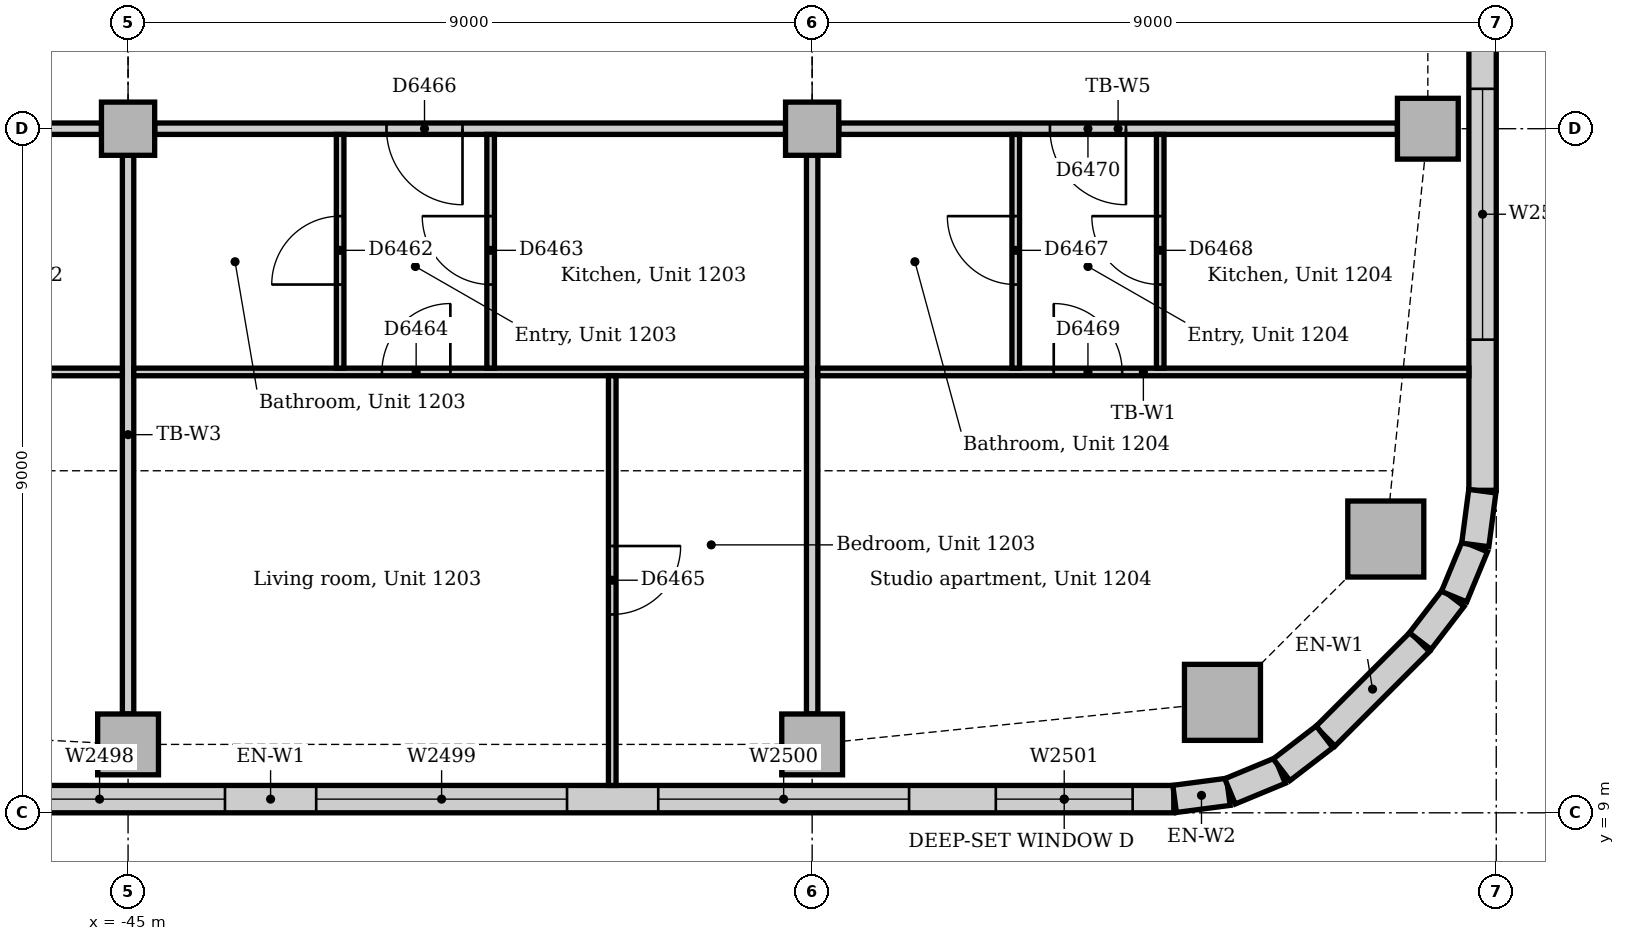
"""IFC4 building model, lengths in metres.
Left out: names, types, materials, properties, quantities, classifications, styles, units other than length and angle.
Written with IfcOpenShell. Run it as: python <this file> out.ifc"""

import sys

from ifc_helpers import new_model, si_unit, direction, frame, frame_2d, origin, origin_2d, place, context, subcontext, project, spatial, rectangle, extrude, element, fill, save


model = new_model("IFC4")
c1 = context("Model", 3, precision=1e-05, world=origin(), true_north=direction((0.0, 1.0)))
c2 = subcontext(c1, "Body", "Model", "MODEL_VIEW")
j1 = project(units=[si_unit("LENGTHUNIT", "METRE"), si_unit("PLANEANGLEUNIT", "RADIAN")], contexts=[c1])
p1 = place(None, origin())
s1 = spatial("IfcSite", under=j1, at=p1, CompositionType="ELEMENT")
p2 = place(p1, origin())
s2 = spatial("IfcBuilding", under=s1, at=p2, CompositionType="ELEMENT")
p3 = place(p2, frame((0.0, 0.0, 55.0)))
s3 = spatial("IfcBuildingStorey", under=s2, at=p3, CompositionType="ELEMENT", Elevation=55.0)
for number, where, z_axis, x_axis in (
    (1, (-30.602, 10.453, 0.0), (0.0, 0.0, 1.0), (1.0, 0.0, 0.0)),
    (2, (-28.453, 12.602, 0.0), (0.0, 0.0, 1.0), (1.0, 0.0, 0.0)),
):
    element("IfcColumn", number, at=place(p3, frame(where, z_axis=z_axis, x_axis=x_axis)), inside=s3, PredefinedType="COLUMN", context=c2, shape_type="SweptSolid", body=[
        extrude(rectangle(XDim=1.0, YDim=1.0, at=origin_2d()), origin(), (0.0, 0.0, 1.0), 3.85),
    ])
for number, where, z_axis, x_axis in (
    (3, (-45.0, 9.9, 0.0), (0.0, 0.0, 1.0), (1.0, 0.0, 0.0)),
    (4, (-36.0, 9.9, 0.0), (0.0, 0.0, 1.0), (1.0, 0.0, 0.0)),
    (5, (-27.9, 18.0, 0.0), (0.0, 0.0, 1.0), (1.0, 0.0, 0.0)),
):
    element("IfcColumn", number, at=place(p3, frame(where, z_axis=z_axis, x_axis=x_axis)), inside=s3, PredefinedType="COLUMN", context=c2, shape_type="SweptSolid", body=[
        extrude(rectangle(XDim=0.8, YDim=0.8, at=origin_2d()), origin(), (0.0, 0.0, 1.0), 3.85),
    ])
for number, where, z_axis, x_axis in (
    (6, (-45.0, 18.0, 0.0), (0.0, 0.0, 1.0), (1.0, 0.0, 0.0)),
    (7, (-36.0, 18.0, 0.0), (0.0, 0.0, 1.0), (1.0, 0.0, 0.0)),
):
    element("IfcColumn", number, at=place(p3, frame(where, z_axis=z_axis, x_axis=x_axis)), inside=s3, PredefinedType="COLUMN", context=c2, shape_type="SweptSolid", body=[
        extrude(rectangle(XDim=0.7, YDim=0.7, at=origin_2d()), origin(), (0.0, 0.0, 1.0), 3.85),
    ])
p4 = place(p3, frame((-55.007, 9.18, 0.0), z_axis=(0.0, 0.0, 1.0), x_axis=(1.0, 0.0, 0.0)))
e8 = element("IfcWall", 8, at=p4, inside=s3, PredefinedType="STANDARD", context=c2, shape_type="SweptSolid", body=[
    extrude(rectangle(XDim=23.765, YDim=0.36, at=frame_2d((11.882, 0.0))), origin(), (0.0, 0.0, 1.0), 3.85),
])
p5 = place(p4, frame((3.482, 0.0, 0.9)))
e9 = element("IfcOpeningElement", 9, at=p5, cuts=e8, PredefinedType="OPENING", context=c2, shape_type="SweptSolid", body=[
    extrude(rectangle(XDim=3.3, YDim=1.6, at=frame_2d((1.65, 0.8))), frame((0.0, 0.19, 0.0), z_axis=(0.0, -1.0, 0.0), x_axis=(1.0, 0.0, 0.0)), (0.0, 0.0, 1.0), 0.38),
])
p6 = place(p4, frame((7.982, 0.0, 0.9)))
e10 = element("IfcOpeningElement", 10, at=p6, cuts=e8, PredefinedType="OPENING", context=c2, shape_type="SweptSolid", body=[
    extrude(rectangle(XDim=3.3, YDim=1.6, at=frame_2d((1.65, 0.8))), frame((0.0, 0.19, 0.0), z_axis=(0.0, -1.0, 0.0), x_axis=(1.0, 0.0, 0.0)), (0.0, 0.0, 1.0), 0.38),
])
p7 = place(p4, frame((12.482, 0.0, 0.9)))
e11 = element("IfcOpeningElement", 11, at=p7, cuts=e8, PredefinedType="OPENING", context=c2, shape_type="SweptSolid", body=[
    extrude(rectangle(XDim=3.3, YDim=1.6, at=frame_2d((1.65, 0.8))), frame((0.0, 0.19, 0.0), z_axis=(0.0, -1.0, 0.0), x_axis=(1.0, 0.0, 0.0)), (0.0, 0.0, 1.0), 0.38),
])
p8 = place(p4, frame((16.982, 0.0, 0.9)))
e12 = element("IfcOpeningElement", 12, at=p8, cuts=e8, PredefinedType="OPENING", context=c2, shape_type="SweptSolid", body=[
    extrude(rectangle(XDim=3.3, YDim=1.6, at=frame_2d((1.65, 0.8))), frame((0.0, 0.19, 0.0), z_axis=(0.0, -1.0, 0.0), x_axis=(1.0, 0.0, 0.0)), (0.0, 0.0, 1.0), 0.38),
])
p9 = place(p4, frame((21.424, 0.0, 0.9)))
e13 = element("IfcOpeningElement", 13, at=p9, cuts=e8, PredefinedType="OPENING", context=c2, shape_type="SweptSolid", body=[
    extrude(rectangle(XDim=1.8, YDim=1.6, at=frame_2d((0.9, 0.8))), frame((0.0, 0.19, 0.0), z_axis=(0.0, -1.0, 0.0), x_axis=(1.0, 0.0, 0.0)), (0.0, 0.0, 1.0), 0.38),
])
p10 = place(p3, frame((-29.249, 10.006, 0.0), z_axis=(0.0, 0.0, 1.0), x_axis=(0.707106781187, 0.707106781187, 0.0)))
e14 = element("IfcWall", 14, at=p10, inside=s3, PredefinedType="STANDARD", context=c2, shape_type="SweptSolid", body=[
    extrude(rectangle(XDim=1.757, YDim=0.36, at=frame_2d((0.879, 0.0))), origin(), (0.0, 0.0, 1.0), 3.85),
])
p11 = place(p3, frame((-27.18, 13.243, 0.0), z_axis=(0.0, 0.0, 1.0), x_axis=(0.0, 1.0, 0.0)))
e15 = element("IfcWall", 15, at=p11, inside=s3, PredefinedType="STANDARD", context=c2, shape_type="SweptSolid", body=[
    extrude(rectangle(XDim=7.757, YDim=0.36, at=frame_2d((3.879, 0.0))), origin(), (0.0, 0.0, 1.0), 3.85),
])
p12 = place(p11, frame((1.982, 0.0, 0.9)))
e16 = element("IfcOpeningElement", 16, at=p12, cuts=e15, PredefinedType="OPENING", context=c2, shape_type="SweptSolid", body=[
    extrude(rectangle(XDim=3.3, YDim=1.6, at=frame_2d((1.65, 0.8))), frame((0.0, 0.19, 0.0), z_axis=(0.0, -1.0, 0.0), x_axis=(1.0, 0.0, 0.0)), (0.0, 0.0, 1.0), 0.38),
])
for number, where, z_axis, x_axis in (
    (17, (-31.231, 9.183, 0.0), (0.0, 0.0, 1.0), (0.991, 0.131, 0.0)),
    (18, (-30.503, 9.282, 0.0), (0.0, 0.0, 1.0), (0.924, 0.383, 0.0)),
):
    element("IfcWall", number, at=place(p3, frame(where, z_axis=z_axis, x_axis=x_axis)), inside=s3, PredefinedType="STANDARD", context=c2, shape_type="SweptSolid", body=[
        extrude(rectangle(XDim=0.713, YDim=0.36, at=frame_2d((0.356, 0.0))), origin(), (0.0, 0.0, 1.0), 3.85),
    ])
for number, where, z_axis, x_axis in (
    (19, (-29.825, 9.566, 0.0), (0.0, 0.0, 1.0), (0.793, 0.609, 0.0)),
    (20, (-28.0, 11.259, 0.0), (0.0, 0.0, 1.0), (0.609, 0.793, 0.0)),
):
    element("IfcWall", number, at=place(p3, frame(where, z_axis=z_axis, x_axis=x_axis)), inside=s3, PredefinedType="STANDARD", context=c2, shape_type="SweptSolid", body=[
        extrude(rectangle(XDim=0.713, YDim=0.36, at=frame_2d((0.357, 0.0))), origin(), (0.0, 0.0, 1.0), 3.85),
    ])
for number, where, z_axis, x_axis in (
    (21, (-27.555, 11.844, 0.0), (0.0, 0.0, 1.0), (0.383, 0.924, 0.0)),
    (22, (-27.276, 12.524, 0.0), (0.0, 0.0, 1.0), (0.131, 0.991, 0.0)),
):
    element("IfcWall", number, at=place(p3, frame(where, z_axis=z_axis, x_axis=x_axis)), inside=s3, PredefinedType="STANDARD", context=c2, shape_type="SweptSolid", body=[
        extrude(rectangle(XDim=0.713, YDim=0.36, at=frame_2d((0.356, 0.0))), origin(), (0.0, 0.0, 1.0), 3.85),
    ])
p13 = place(p3, frame((-35.65, 18.0, 0.0), z_axis=(0.0, 0.0, 1.0), x_axis=(1.0, 0.0, 0.0)))
e23 = element("IfcWall", 23, at=p13, inside=s3, PredefinedType="PARTITIONING", context=c2, shape_type="SweptSolid", body=[
    extrude(rectangle(XDim=7.35, YDim=0.15, at=frame_2d((3.675, 0.0))), origin(), (0.0, 0.0, 1.0), 3.158),
])
p14 = place(p13, frame((2.778, 0.0, 0.0)))
e24 = element("IfcOpeningElement", 24, at=p14, cuts=e23, PredefinedType="OPENING", context=c2, shape_type="SweptSolid", body=[
    extrude(rectangle(XDim=1.0, YDim=2.1, at=frame_2d((0.5, 1.05))), frame((0.0, 0.085, 0.0), z_axis=(0.0, -1.0, 0.0), x_axis=(1.0, 0.0, 0.0)), (0.0, 0.0, 1.0), 0.17),
])
p15 = place(p3, frame((-44.65, 18.0, 0.0), z_axis=(0.0, 0.0, 1.0), x_axis=(1.0, 0.0, 0.0)))
e25 = element("IfcWall", 25, at=p15, inside=s3, PredefinedType="PARTITIONING", context=c2, shape_type="SweptSolid", body=[
    extrude(rectangle(XDim=8.3, YDim=0.15, at=frame_2d((4.15, 0.0))), origin(), (0.0, 0.0, 1.0), 3.158),
])
p16 = place(p15, frame((3.05, 0.0, 0.0)))
e26 = element("IfcOpeningElement", 26, at=p16, cuts=e25, PredefinedType="OPENING", context=c2, shape_type="SweptSolid", body=[
    extrude(rectangle(XDim=1.0, YDim=2.1, at=frame_2d((0.5, 1.05))), frame((0.0, 0.085, 0.0), z_axis=(0.0, -1.0, 0.0), x_axis=(1.0, 0.0, 0.0)), (0.0, 0.0, 1.0), 0.17),
])
p17 = place(p3, frame((-53.65, 18.0, 0.0), z_axis=(0.0, 0.0, 1.0), x_axis=(1.0, 0.0, 0.0)))
e27 = element("IfcWall", 27, at=p17, inside=s3, PredefinedType="PARTITIONING", context=c2, shape_type="SweptSolid", body=[
    extrude(rectangle(XDim=8.3, YDim=0.15, at=frame_2d((4.15, 0.0))), origin(), (0.0, 0.0, 1.0), 3.158),
])
p18 = place(p17, frame((2.94, 0.0, 0.0)))
e28 = element("IfcOpeningElement", 28, at=p18, cuts=e27, PredefinedType="OPENING", context=c2, shape_type="SweptSolid", body=[
    extrude(rectangle(XDim=1.0, YDim=2.1, at=frame_2d((0.5, 1.05))), frame((0.0, 0.085, 0.0), z_axis=(0.0, -1.0, 0.0), x_axis=(1.0, 0.0, 0.0)), (0.0, 0.0, 1.0), 0.17),
])
for number, where, z_axis, x_axis in (
    (29, (-45.0, 10.3, 0.0), (0.0, 0.0, 1.0), (0.0, 1.0, 0.0)),
    (30, (-36.0, 10.3, 0.0), (0.0, 0.0, 1.0), (0.0, 1.0, 0.0)),
):
    element("IfcWall", number, at=place(p3, frame(where, z_axis=z_axis, x_axis=x_axis)), inside=s3, PredefinedType="PARTITIONING", context=c2, shape_type="SweptSolid", body=[
        extrude(rectangle(XDim=7.35, YDim=0.15, at=frame_2d((3.675, 0.0))), origin(), (0.0, 0.0, 1.0), 3.256),
    ])
p19 = place(p3, frame((-54.05, 14.8, 0.0), z_axis=(0.0, 0.0, 1.0), x_axis=(1.0, 0.0, 0.0)))
e31 = element("IfcWall", 31, at=p19, inside=s3, PredefinedType="PARTITIONING", context=c2, shape_type="SweptSolid", body=[
    extrude(rectangle(XDim=8.975, YDim=0.1, at=frame_2d((4.487, 0.0))), origin(), (0.0, 0.0, 1.0), 3.85),
])
p20 = place(p19, frame((3.39, 0.0, 0.0)))
e32 = element("IfcOpeningElement", 32, at=p20, cuts=e31, PredefinedType="OPENING", context=c2, shape_type="SweptSolid", body=[
    extrude(rectangle(XDim=0.9, YDim=2.1, at=frame_2d((0.45, 1.05))), frame((0.0, 0.06, 0.0), z_axis=(0.0, -1.0, 0.0), x_axis=(1.0, 0.0, 0.0)), (0.0, 0.0, 1.0), 0.12),
])
p21 = place(p3, frame((-44.925, 14.8, 0.0), z_axis=(0.0, 0.0, 1.0), x_axis=(1.0, 0.0, 0.0)))
e33 = element("IfcWall", 33, at=p21, inside=s3, PredefinedType="PARTITIONING", context=c2, shape_type="SweptSolid", body=[
    extrude(rectangle(XDim=8.85, YDim=0.1, at=frame_2d((4.425, 0.0))), origin(), (0.0, 0.0, 1.0), 3.85),
])
p22 = place(p21, frame((3.265, 0.0, 0.0)))
e34 = element("IfcOpeningElement", 34, at=p22, cuts=e33, PredefinedType="OPENING", context=c2, shape_type="SweptSolid", body=[
    extrude(rectangle(XDim=0.9, YDim=2.1, at=frame_2d((0.45, 1.05))), frame((0.0, 0.06, 0.0), z_axis=(0.0, -1.0, 0.0), x_axis=(1.0, 0.0, 0.0)), (0.0, 0.0, 1.0), 0.12),
])
p23 = place(p3, frame((-35.925, 14.8, 0.0), z_axis=(0.0, 0.0, 1.0), x_axis=(1.0, 0.0, 0.0)))
e35 = element("IfcWall", 35, at=p23, inside=s3, PredefinedType="PARTITIONING", context=c2, shape_type="SweptSolid", body=[
    extrude(rectangle(XDim=8.565, YDim=0.1, at=frame_2d((4.282, 0.0))), origin(), (0.0, 0.0, 1.0), 3.85),
])
p24 = place(p23, frame((3.103, 0.0, 0.0)))
e36 = element("IfcOpeningElement", 36, at=p24, cuts=e35, PredefinedType="OPENING", context=c2, shape_type="SweptSolid", body=[
    extrude(rectangle(XDim=0.9, YDim=2.1, at=frame_2d((0.45, 1.05))), frame((0.0, 0.06, 0.0), z_axis=(0.0, -1.0, 0.0), x_axis=(1.0, 0.0, 0.0)), (0.0, 0.0, 1.0), 0.12),
])
p25 = place(p3, frame((-38.63, 9.36, 0.0), z_axis=(0.0, 0.0, 1.0), x_axis=(0.0, 1.0, 0.0)))
e37 = element("IfcWall", 37, at=p25, inside=s3, PredefinedType="PARTITIONING", context=c2, shape_type="SweptSolid", body=[
    extrude(rectangle(XDim=5.39, YDim=0.1, at=frame_2d((2.695, 0.0))), origin(), (0.0, 0.0, 1.0), 3.85),
])
p26 = place(p25, frame((2.25, 0.0, 0.0)))
e38 = element("IfcOpeningElement", 38, at=p26, cuts=e37, PredefinedType="OPENING", context=c2, shape_type="SweptSolid", body=[
    extrude(rectangle(XDim=0.9, YDim=2.1, at=frame_2d((0.45, 1.05))), frame((0.0, 0.06, 0.0), z_axis=(0.0, -1.0, 0.0), x_axis=(1.0, 0.0, 0.0)), (0.0, 0.0, 1.0), 0.12),
])
p27 = place(p3, frame((-42.21, 14.85, 0.0), z_axis=(0.0, 0.0, 1.0), x_axis=(0.0, 1.0, 0.0)))
e39 = element("IfcWall", 39, at=p27, inside=s3, PredefinedType="PARTITIONING", context=c2, shape_type="SweptSolid", body=[
    extrude(rectangle(XDim=3.075, YDim=0.1, at=frame_2d((1.538, 0.0))), origin(), (0.0, 0.0, 1.0), 3.85),
])
p28 = place(p27, frame((1.1, 0.0, 0.0)))
e40 = element("IfcOpeningElement", 40, at=p28, cuts=e39, PredefinedType="OPENING", context=c2, shape_type="SweptSolid", body=[
    extrude(rectangle(XDim=0.9, YDim=2.1, at=frame_2d((0.45, 1.05))), frame((0.0, 0.06, 0.0), z_axis=(0.0, -1.0, 0.0), x_axis=(1.0, 0.0, 0.0)), (0.0, 0.0, 1.0), 0.12),
])
p29 = place(p3, frame((-40.23, 14.85, 0.0), z_axis=(0.0, 0.0, 1.0), x_axis=(0.0, 1.0, 0.0)))
e41 = element("IfcWall", 41, at=p29, inside=s3, PredefinedType="PARTITIONING", context=c2, shape_type="SweptSolid", body=[
    extrude(rectangle(XDim=3.075, YDim=0.1, at=frame_2d((1.538, 0.0))), origin(), (0.0, 0.0, 1.0), 3.85),
])
p30 = place(p29, frame((1.1, 0.0, 0.0)))
e42 = element("IfcOpeningElement", 42, at=p30, cuts=e41, PredefinedType="OPENING", context=c2, shape_type="SweptSolid", body=[
    extrude(rectangle(XDim=0.9, YDim=2.1, at=frame_2d((0.45, 1.05))), frame((0.0, 0.06, 0.0), z_axis=(0.0, -1.0, 0.0), x_axis=(1.0, 0.0, 0.0)), (0.0, 0.0, 1.0), 0.12),
])
p31 = place(p3, frame((-33.322, 14.85, 0.0), z_axis=(0.0, 0.0, 1.0), x_axis=(0.0, 1.0, 0.0)))
e43 = element("IfcWall", 43, at=p31, inside=s3, PredefinedType="PARTITIONING", context=c2, shape_type="SweptSolid", body=[
    extrude(rectangle(XDim=3.075, YDim=0.1, at=frame_2d((1.538, 0.0))), origin(), (0.0, 0.0, 1.0), 3.85),
])
p32 = place(p31, frame((1.1, 0.0, 0.0)))
e44 = element("IfcOpeningElement", 44, at=p32, cuts=e43, PredefinedType="OPENING", context=c2, shape_type="SweptSolid", body=[
    extrude(rectangle(XDim=0.9, YDim=2.1, at=frame_2d((0.45, 1.05))), frame((0.0, 0.06, 0.0), z_axis=(0.0, -1.0, 0.0), x_axis=(1.0, 0.0, 0.0)), (0.0, 0.0, 1.0), 0.12),
])
p33 = place(p3, frame((-31.421, 14.85, 0.0), z_axis=(0.0, 0.0, 1.0), x_axis=(0.0, 1.0, 0.0)))
e45 = element("IfcWall", 45, at=p33, inside=s3, PredefinedType="PARTITIONING", context=c2, shape_type="SweptSolid", body=[
    extrude(rectangle(XDim=3.075, YDim=0.1, at=frame_2d((1.538, 0.0))), origin(), (0.0, 0.0, 1.0), 3.85),
])
p34 = place(p33, frame((1.1, 0.0, 0.0)))
e46 = element("IfcOpeningElement", 46, at=p34, cuts=e45, PredefinedType="OPENING", context=c2, shape_type="SweptSolid", body=[
    extrude(rectangle(XDim=0.9, YDim=2.1, at=frame_2d((0.45, 1.05))), frame((0.0, 0.06, 0.0), z_axis=(0.0, -1.0, 0.0), x_axis=(1.0, 0.0, 0.0)), (0.0, 0.0, 1.0), 0.12),
])
p35 = place(p6, origin())
e47 = element("IfcWindow", 47, at=p35, inside=s3, PartitioningType="SINGLE_PANEL", PredefinedType="WINDOW", context=c2, shape_type="SweptSolid", body=[
    extrude(rectangle(XDim=3.3, YDim=1.6, at=frame_2d((1.65, 0.8))), frame((0.0, 0.13, 0.0), z_axis=(0.0, -1.0, 0.0), x_axis=(1.0, 0.0, 0.0)), (0.0, 0.0, 1.0), 0.06),
])
fill(e10, e47)
p36 = place(p7, origin())
e48 = element("IfcWindow", 48, at=p36, inside=s3, PartitioningType="SINGLE_PANEL", PredefinedType="WINDOW", context=c2, shape_type="SweptSolid", body=[
    extrude(rectangle(XDim=3.3, YDim=1.6, at=frame_2d((1.65, 0.8))), frame((0.0, 0.13, 0.0), z_axis=(0.0, -1.0, 0.0), x_axis=(1.0, 0.0, 0.0)), (0.0, 0.0, 1.0), 0.06),
])
fill(e11, e48)
p37 = place(p8, origin())
e49 = element("IfcWindow", 49, at=p37, inside=s3, PartitioningType="SINGLE_PANEL", PredefinedType="WINDOW", context=c2, shape_type="SweptSolid", body=[
    extrude(rectangle(XDim=3.3, YDim=1.6, at=frame_2d((1.65, 0.8))), frame((0.0, 0.13, 0.0), z_axis=(0.0, -1.0, 0.0), x_axis=(1.0, 0.0, 0.0)), (0.0, 0.0, 1.0), 0.06),
])
fill(e12, e49)
p38 = place(p9, origin())
e50 = element("IfcWindow", 50, at=p38, inside=s3, PartitioningType="SINGLE_PANEL", PredefinedType="WINDOW", context=c2, shape_type="SweptSolid", body=[
    extrude(rectangle(XDim=1.8, YDim=1.6, at=frame_2d((0.9, 0.8))), frame((0.0, 0.13, 0.0), z_axis=(0.0, -1.0, 0.0), x_axis=(1.0, 0.0, 0.0)), (0.0, 0.0, 1.0), 0.06),
])
fill(e13, e50)
p39 = place(p12, origin())
e51 = element("IfcWindow", 51, at=p39, inside=s3, PartitioningType="SINGLE_PANEL", PredefinedType="WINDOW", context=c2, shape_type="SweptSolid", body=[
    extrude(rectangle(XDim=3.3, YDim=1.6, at=frame_2d((1.65, 0.8))), frame((0.0, 0.13, 0.0), z_axis=(0.0, -1.0, 0.0), x_axis=(1.0, 0.0, 0.0)), (0.0, 0.0, 1.0), 0.06),
])
fill(e16, e51)
p40 = place(p28, origin())
e52 = element("IfcDoor", 52, at=p40, inside=s3, OperationType="SINGLE_SWING_LEFT", PredefinedType="DOOR", context=c2, shape_type="SweptSolid", body=[
    extrude(rectangle(XDim=0.9, YDim=2.1, at=frame_2d((0.45, 1.05))), frame((0.0, 0.025, 0.0), z_axis=(0.0, -1.0, 0.0), x_axis=(1.0, 0.0, 0.0)), (0.0, 0.0, 1.0), 0.05),
])
fill(e40, e52)
p41 = place(p30, origin())
e53 = element("IfcDoor", 53, at=p41, inside=s3, OperationType="SINGLE_SWING_RIGHT", PredefinedType="DOOR", context=c2, shape_type="SweptSolid", body=[
    extrude(rectangle(XDim=0.9, YDim=2.1, at=frame_2d((0.45, 1.05))), frame((0.0, 0.025, 0.0), z_axis=(0.0, -1.0, 0.0), x_axis=(1.0, 0.0, 0.0)), (0.0, 0.0, 1.0), 0.05),
])
fill(e42, e53)
p42 = place(p22, origin())
e54 = element("IfcDoor", 54, at=p42, inside=s3, OperationType="SINGLE_SWING_RIGHT", PredefinedType="DOOR", context=c2, shape_type="SweptSolid", body=[
    extrude(rectangle(XDim=0.9, YDim=2.1, at=frame_2d((0.45, 1.05))), frame((0.0, 0.025, 0.0), z_axis=(0.0, -1.0, 0.0), x_axis=(1.0, 0.0, 0.0)), (0.0, 0.0, 1.0), 0.05),
])
fill(e34, e54)
p43 = place(p26, frame((0.9, 0.0, 0.0), z_axis=(0.0, 0.0, 1.0), x_axis=(-1.0, 0.0, 0.0)))
e55 = element("IfcDoor", 55, at=p43, inside=s3, OperationType="SINGLE_SWING_LEFT", PredefinedType="DOOR", context=c2, shape_type="SweptSolid", body=[
    extrude(rectangle(XDim=0.9, YDim=2.1, at=frame_2d((0.45, 1.05))), frame((0.0, 0.025, 0.0), z_axis=(0.0, -1.0, 0.0), x_axis=(1.0, 0.0, 0.0)), (0.0, 0.0, 1.0), 0.05),
])
fill(e38, e55)
p44 = place(p16, frame((1.0, 0.0, 0.0), z_axis=(0.0, 0.0, 1.0), x_axis=(-1.0, 0.0, 0.0)))
e56 = element("IfcDoor", 56, at=p44, inside=s3, OperationType="SINGLE_SWING_LEFT", PredefinedType="DOOR", context=c2, shape_type="SweptSolid", body=[
    extrude(rectangle(XDim=1.0, YDim=2.1, at=frame_2d((0.5, 1.05))), frame((0.0, 0.025, 0.0), z_axis=(0.0, -1.0, 0.0), x_axis=(1.0, 0.0, 0.0)), (0.0, 0.0, 1.0), 0.05),
])
fill(e26, e56)
p45 = place(p32, origin())
e57 = element("IfcDoor", 57, at=p45, inside=s3, OperationType="SINGLE_SWING_RIGHT", PredefinedType="DOOR", context=c2, shape_type="SweptSolid", body=[
    extrude(rectangle(XDim=0.9, YDim=2.1, at=frame_2d((0.45, 1.05))), frame((0.0, 0.025, 0.0), z_axis=(0.0, -1.0, 0.0), x_axis=(1.0, 0.0, 0.0)), (0.0, 0.0, 1.0), 0.05),
])
fill(e44, e57)
p46 = place(p34, origin())
e58 = element("IfcDoor", 58, at=p46, inside=s3, OperationType="SINGLE_SWING_RIGHT", PredefinedType="DOOR", context=c2, shape_type="SweptSolid", body=[
    extrude(rectangle(XDim=0.9, YDim=2.1, at=frame_2d((0.45, 1.05))), frame((0.0, 0.025, 0.0), z_axis=(0.0, -1.0, 0.0), x_axis=(1.0, 0.0, 0.0)), (0.0, 0.0, 1.0), 0.05),
])
fill(e46, e58)
p47 = place(p24, origin())
e59 = element("IfcDoor", 59, at=p47, inside=s3, OperationType="SINGLE_SWING_LEFT", PredefinedType="DOOR", context=c2, shape_type="SweptSolid", body=[
    extrude(rectangle(XDim=0.9, YDim=2.1, at=frame_2d((0.45, 1.05))), frame((0.0, 0.025, 0.0), z_axis=(0.0, -1.0, 0.0), x_axis=(1.0, 0.0, 0.0)), (0.0, 0.0, 1.0), 0.05),
])
fill(e36, e59)
p48 = place(p14, frame((1.0, 0.0, 0.0), z_axis=(0.0, 0.0, 1.0), x_axis=(-1.0, 0.0, 0.0)))
e60 = element("IfcDoor", 60, at=p48, inside=s3, OperationType="SINGLE_SWING_LEFT", PredefinedType="DOOR", context=c2, shape_type="SweptSolid", body=[
    extrude(rectangle(XDim=1.0, YDim=2.1, at=frame_2d((0.5, 1.05))), frame((0.0, 0.025, 0.0), z_axis=(0.0, -1.0, 0.0), x_axis=(1.0, 0.0, 0.0)), (0.0, 0.0, 1.0), 0.05),
])
fill(e24, e60)
save(model, sys.argv[1])
